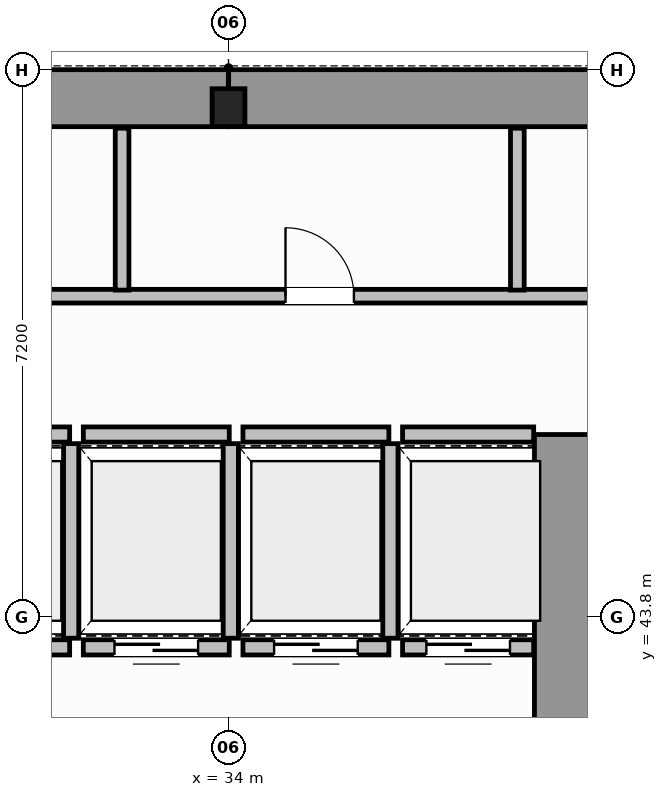
"""IFC4 building model, lengths in metres.
Left out: names, types, materials, properties, quantities, classifications, styles, units other than length and angle.
Written with IfcOpenShell. Run it as: python <this file> out.ifc"""

import sys

from ifc_helpers import new_model, si_unit, direction, frame, frame_2d, origin, origin_2d, place, context, subcontext, project, spatial, rectangle, i_section, extrude, source, transform, mapped, element, fill, save


model = new_model("IFC4")
c1 = context("Model", 3, precision=1e-05, world=origin(), true_north=direction((0.0, 1.0)))
c2 = subcontext(c1, "Body", "Model", "MODEL_VIEW")
j1 = project(units=[si_unit("LENGTHUNIT", "METRE"), si_unit("PLANEANGLEUNIT", "RADIAN")], contexts=[c1])
p1 = place(None, origin())
s1 = spatial("IfcSite", under=j1, at=p1, CompositionType="ELEMENT")
p2 = place(p1, origin())
s2 = spatial("IfcBuilding", under=s1, at=p2, CompositionType="ELEMENT")
p3 = place(p2, frame((0.0, 0.0, 141.4)))
s3 = spatial("IfcBuildingStorey", under=s2, at=p3, CompositionType="ELEMENT", Elevation=141.4)
m1 = source(origin(), c2, "Body", "SweptSolid", [
    extrude(i_section(OverallWidth=0.432, OverallDepth=0.498, WebThickness=0.055, FlangeThickness=0.068, FilletRadius=0.015, at=origin_2d()), origin(), (0.0, 0.0, 1.0), 3.8),
])
p4 = place(p3, frame((34.0, 50.5, 0.0), z_axis=(0.0, 0.0, 1.0), x_axis=(1.0, 0.0, 0.0)))
e1 = element("IfcColumn", 1, at=p4, inside=s3, PredefinedType="COLUMN", context=c2, shape_type="MappedRepresentation", body=[
    mapped(m1, transform((0.0, 0.0, 0.0), scale=1.0)),
])
for number, where, z_axis, x_axis in (
    (2, (14.379, 50.625, 0.0), (0.0, 0.0, 1.0), (1.0, 0.0, 0.0)),
    (3, (34.002, 50.625, 0.0), (0.0, 0.0, 1.0), (1.0, 0.0, 0.0)),
):
    element("IfcWall", number, at=place(p3, frame(where, z_axis=z_axis, x_axis=x_axis)), inside=s3, PredefinedType="SHEAR", context=c2, shape_type="SweptSolid", body=[
        extrude(rectangle(XDim=19.619, YDim=0.75, at=frame_2d((9.81, 0.0))), origin(), (0.0, 0.0, 1.0), 3.8),
    ])
p5 = place(p3, frame((38.4, 36.895, 0.0), z_axis=(0.0, 0.0, 1.0), x_axis=(0.0, 1.0, 0.0)))
e4 = element("IfcWall", 4, at=p5, inside=s3, PredefinedType="SHEAR", context=c2, shape_type="SweptSolid", body=[
    extrude(rectangle(XDim=9.305, YDim=0.75, at=frame_2d((4.652, 0.0))), origin(), (0.0, 0.0, 1.0), 3.8),
])
p6 = place(p3, frame((30.185, 43.4, 0.0), z_axis=(0.0, 0.0, 1.0), x_axis=(1.0, 0.0, 0.0)))
e5 = element("IfcWall", 5, at=p6, inside=s3, PredefinedType="SOLIDWALL", context=c2, shape_type="SweptSolid", body=[
    extrude(rectangle(XDim=1.725, YDim=0.2, at=frame_2d((0.862, 0.0))), origin(), (0.0, 0.0, 1.0), 3.58),
])
p7 = place(p6, frame((0.313, 0.0, 0.0)))
e6 = element("IfcOpeningElement", 6, at=p7, cuts=e5, PredefinedType="OPENING", context=c2, shape_type="SweptSolid", body=[
    extrude(rectangle(XDim=1.1, YDim=2.15, at=frame_2d((0.55, 1.075))), frame((0.0, 0.11, 0.0), z_axis=(0.0, -1.0, 0.0), x_axis=(1.0, 0.0, 0.0)), (0.0, 0.0, 1.0), 0.22),
])
p8 = place(p3, frame((30.185, 46.2, 0.0), z_axis=(0.0, 0.0, 1.0), x_axis=(1.0, 0.0, 0.0)))
e7 = element("IfcWall", 7, at=p8, inside=s3, PredefinedType="SOLIDWALL", context=c2, shape_type="SweptSolid", body=[
    extrude(rectangle(XDim=1.725, YDim=0.2, at=frame_2d((0.862, 0.0))), origin(), (0.0, 0.0, 1.0), 3.58),
])
p9 = place(p3, frame((31.93, 43.52, 0.0), z_axis=(0.0, 0.0, 1.0), x_axis=(0.0, 1.0, 0.0)))
e8 = element("IfcWall", 8, at=p9, inside=s3, PredefinedType="SOLIDWALL", context=c2, shape_type="SweptSolid", body=[
    extrude(rectangle(XDim=2.56, YDim=0.2, at=frame_2d((1.28, 0.0))), origin(), (0.0, 0.0, 1.0), 3.58),
])
p10 = place(p3, frame((32.09, 43.4, 0.0), z_axis=(0.0, 0.0, 1.0), x_axis=(1.0, 0.0, 0.0)))
e9 = element("IfcWall", 9, at=p10, inside=s3, PredefinedType="SOLIDWALL", context=c2, shape_type="SweptSolid", body=[
    extrude(rectangle(XDim=1.92, YDim=0.2, at=frame_2d((0.96, 0.0))), origin(), (0.0, 0.0, 1.0), 3.58),
])
p11 = place(p10, frame((0.41, 0.0, 0.0)))
e10 = element("IfcOpeningElement", 10, at=p11, cuts=e9, PredefinedType="OPENING", context=c2, shape_type="SweptSolid", body=[
    extrude(rectangle(XDim=1.1, YDim=2.15, at=frame_2d((0.55, 1.075))), frame((0.0, 0.11, 0.0), z_axis=(0.0, -1.0, 0.0), x_axis=(1.0, 0.0, 0.0)), (0.0, 0.0, 1.0), 0.22),
])
p12 = place(p3, frame((32.09, 46.2, 0.0), z_axis=(0.0, 0.0, 1.0), x_axis=(1.0, 0.0, 0.0)))
e11 = element("IfcWall", 11, at=p12, inside=s3, PredefinedType="SOLIDWALL", context=c2, shape_type="SweptSolid", body=[
    extrude(rectangle(XDim=1.92, YDim=0.2, at=frame_2d((0.96, 0.0))), origin(), (0.0, 0.0, 1.0), 3.58),
])
p13 = place(p3, frame((34.03, 43.52, 0.0), z_axis=(0.0, 0.0, 1.0), x_axis=(0.0, 1.0, 0.0)))
e12 = element("IfcWall", 12, at=p13, inside=s3, PredefinedType="SOLIDWALL", context=c2, shape_type="SweptSolid", body=[
    extrude(rectangle(XDim=2.56, YDim=0.2, at=frame_2d((1.28, 0.0))), origin(), (0.0, 0.0, 1.0), 3.58),
])
p14 = place(p3, frame((34.19, 43.4, 0.0), z_axis=(0.0, 0.0, 1.0), x_axis=(1.0, 0.0, 0.0)))
e13 = element("IfcWall", 13, at=p14, inside=s3, PredefinedType="SOLIDWALL", context=c2, shape_type="SweptSolid", body=[
    extrude(rectangle(XDim=1.92, YDim=0.2, at=frame_2d((0.96, 0.0))), origin(), (0.0, 0.0, 1.0), 3.58),
])
p15 = place(p14, frame((0.41, 0.0, 0.0)))
e14 = element("IfcOpeningElement", 14, at=p15, cuts=e13, PredefinedType="OPENING", context=c2, shape_type="SweptSolid", body=[
    extrude(rectangle(XDim=1.1, YDim=2.15, at=frame_2d((0.55, 1.075))), frame((0.0, 0.11, 0.0), z_axis=(0.0, -1.0, 0.0), x_axis=(1.0, 0.0, 0.0)), (0.0, 0.0, 1.0), 0.22),
])
p16 = place(p3, frame((34.19, 46.2, 0.0), z_axis=(0.0, 0.0, 1.0), x_axis=(1.0, 0.0, 0.0)))
e15 = element("IfcWall", 15, at=p16, inside=s3, PredefinedType="SOLIDWALL", context=c2, shape_type="SweptSolid", body=[
    extrude(rectangle(XDim=1.92, YDim=0.2, at=frame_2d((0.96, 0.0))), origin(), (0.0, 0.0, 1.0), 3.58),
])
p17 = place(p3, frame((36.13, 43.52, 0.0), z_axis=(0.0, 0.0, 1.0), x_axis=(0.0, 1.0, 0.0)))
e16 = element("IfcWall", 16, at=p17, inside=s3, PredefinedType="SOLIDWALL", context=c2, shape_type="SweptSolid", body=[
    extrude(rectangle(XDim=2.56, YDim=0.2, at=frame_2d((1.28, 0.0))), origin(), (0.0, 0.0, 1.0), 3.58),
])
p18 = place(p3, frame((36.29, 43.4, 0.0), z_axis=(0.0, 0.0, 1.0), x_axis=(1.0, 0.0, 0.0)))
e17 = element("IfcWall", 17, at=p18, inside=s3, PredefinedType="SOLIDWALL", context=c2, shape_type="SweptSolid", body=[
    extrude(rectangle(XDim=1.725, YDim=0.2, at=frame_2d((0.862, 0.0))), origin(), (0.0, 0.0, 1.0), 3.58),
])
p19 = place(p18, frame((0.313, 0.0, 0.0)))
e18 = element("IfcOpeningElement", 18, at=p19, cuts=e17, PredefinedType="OPENING", context=c2, shape_type="SweptSolid", body=[
    extrude(rectangle(XDim=1.1, YDim=2.15, at=frame_2d((0.55, 1.075))), frame((0.0, 0.11, 0.0), z_axis=(0.0, -1.0, 0.0), x_axis=(1.0, 0.0, 0.0)), (0.0, 0.0, 1.0), 0.22),
])
p20 = place(p3, frame((36.29, 46.2, 0.0), z_axis=(0.0, 0.0, 1.0), x_axis=(1.0, 0.0, 0.0)))
e19 = element("IfcWall", 19, at=p20, inside=s3, PredefinedType="SOLIDWALL", context=c2, shape_type="SweptSolid", body=[
    extrude(rectangle(XDim=1.725, YDim=0.2, at=frame_2d((0.862, 0.0))), origin(), (0.0, 0.0, 1.0), 3.58),
])
p21 = place(p3, frame((18.62, 48.02, 0.0), z_axis=(0.0, 0.0, 1.0), x_axis=(1.0, 0.0, 0.0)))
e20 = element("IfcWall", 20, at=p21, inside=s3, PredefinedType="PLUMBINGWALL", context=c2, shape_type="SweptSolid", body=[
    extrude(rectangle(XDim=30.76, YDim=0.18, at=frame_2d((15.38, 0.0))), origin(), (0.0, 0.0, 1.0), 3.58),
])
p22 = place(p21, frame((1.655, 0.0, 0.0)))
e21 = element("IfcOpeningElement", 21, at=p22, cuts=e20, PredefinedType="OPENING", context=c2, shape_type="SweptSolid", body=[
    extrude(rectangle(XDim=0.9, YDim=2.15, at=frame_2d((0.45, 1.075))), frame((0.0, 0.1, 0.0), z_axis=(0.0, -1.0, 0.0), x_axis=(1.0, 0.0, 0.0)), (0.0, 0.0, 1.0), 0.2),
])
p23 = place(p21, frame((6.03, 0.0, 0.0)))
e22 = element("IfcOpeningElement", 22, at=p23, cuts=e20, PredefinedType="OPENING", context=c2, shape_type="SweptSolid", body=[
    extrude(rectangle(XDim=0.9, YDim=2.15, at=frame_2d((0.45, 1.075))), frame((0.0, 0.1, 0.0), z_axis=(0.0, -1.0, 0.0), x_axis=(1.0, 0.0, 0.0)), (0.0, 0.0, 1.0), 0.2),
])
p24 = place(p21, frame((10.93, 0.0, 0.0)))
e23 = element("IfcOpeningElement", 23, at=p24, cuts=e20, PredefinedType="OPENING", context=c2, shape_type="SweptSolid", body=[
    extrude(rectangle(XDim=0.9, YDim=2.15, at=frame_2d((0.45, 1.075))), frame((0.0, 0.1, 0.0), z_axis=(0.0, -1.0, 0.0), x_axis=(1.0, 0.0, 0.0)), (0.0, 0.0, 1.0), 0.2),
])
p25 = place(p21, frame((16.13, 0.0, 0.0)))
e24 = element("IfcOpeningElement", 24, at=p25, cuts=e20, PredefinedType="OPENING", context=c2, shape_type="SweptSolid", body=[
    extrude(rectangle(XDim=0.9, YDim=2.15, at=frame_2d((0.45, 1.075))), frame((0.0, 0.1, 0.0), z_axis=(0.0, -1.0, 0.0), x_axis=(1.0, 0.0, 0.0)), (0.0, 0.0, 1.0), 0.2),
])
p26 = place(p21, frame((21.73, 0.0, 0.0)))
e25 = element("IfcOpeningElement", 25, at=p26, cuts=e20, PredefinedType="OPENING", context=c2, shape_type="SweptSolid", body=[
    extrude(rectangle(XDim=0.9, YDim=2.15, at=frame_2d((0.45, 1.075))), frame((0.0, 0.1, 0.0), z_axis=(0.0, -1.0, 0.0), x_axis=(1.0, 0.0, 0.0)), (0.0, 0.0, 1.0), 0.2),
])
p27 = place(p21, frame((27.505, 0.0, 0.0)))
e26 = element("IfcOpeningElement", 26, at=p27, cuts=e20, PredefinedType="OPENING", context=c2, shape_type="SweptSolid", body=[
    extrude(rectangle(XDim=0.9, YDim=2.15, at=frame_2d((0.45, 1.075))), frame((0.0, 0.1, 0.0), z_axis=(0.0, -1.0, 0.0), x_axis=(1.0, 0.0, 0.0)), (0.0, 0.0, 1.0), 0.2),
])
for number, where, z_axis, x_axis in (
    (27, (32.6, 48.1, 0.0), (0.0, 0.0, 1.0), (0.0, 1.0, 0.0)),
    (28, (37.8, 48.1, 0.0), (0.0, 0.0, 1.0), (0.0, 1.0, 0.0)),
):
    element("IfcWall", number, at=place(p3, frame(where, z_axis=z_axis, x_axis=x_axis)), inside=s3, PredefinedType="PLUMBINGWALL", context=c2, shape_type="SweptSolid", body=[
        extrude(rectangle(XDim=2.13, YDim=0.18, at=frame_2d((1.065, 0.0))), origin(), (0.0, 0.0, 1.0), 3.58),
    ])
m2 = source(origin(), c2, "Body", "SweptSolid", [
    extrude(rectangle(XDim=1.1, YDim=2.15, at=frame_2d((0.55, 1.075))), frame((0.0, 0.025, 0.0), z_axis=(0.0, -1.0, 0.0), x_axis=(1.0, 0.0, 0.0)), (0.0, 0.0, 1.0), 0.05),
])
p28 = place(p11, origin())
e29 = element("IfcDoor", 29, at=p28, inside=s3, OperationType="DOUBLE_DOOR_SLIDING", PredefinedType="DOOR", context=c2, shape_type="MappedRepresentation", body=[
    mapped(m2, transform((0.0, 0.0, 0.0), scale=1.0)),
])
fill(e10, e29)
p29 = place(p15, origin())
e30 = element("IfcDoor", 30, at=p29, inside=s3, OperationType="DOUBLE_DOOR_SLIDING", PredefinedType="DOOR", context=c2, shape_type="MappedRepresentation", body=[
    mapped(m2, transform((0.0, 0.0, 0.0), scale=1.0)),
])
fill(e14, e30)
p30 = place(p19, origin())
e31 = element("IfcDoor", 31, at=p30, inside=s3, OperationType="DOUBLE_DOOR_SLIDING", PredefinedType="DOOR", context=c2, shape_type="MappedRepresentation", body=[
    mapped(m2, transform((0.0, 0.0, 0.0), scale=1.0)),
])
fill(e18, e31)
m3 = source(origin(), c2, "Body", "SweptSolid", [
    extrude(rectangle(XDim=0.9, YDim=2.15, at=frame_2d((0.45, 1.075))), frame((0.0, 0.025, 0.0), z_axis=(0.0, -1.0, 0.0), x_axis=(1.0, 0.0, 0.0)), (0.0, 0.0, 1.0), 0.05),
])
p31 = place(p25, origin())
e32 = element("IfcDoor", 32, at=p31, inside=s3, OperationType="SINGLE_SWING_RIGHT", PredefinedType="DOOR", context=c2, shape_type="MappedRepresentation", body=[
    mapped(m3, transform((0.0, 0.0, 0.0), scale=1.0)),
])
fill(e24, e32)
save(model, sys.argv[1])
